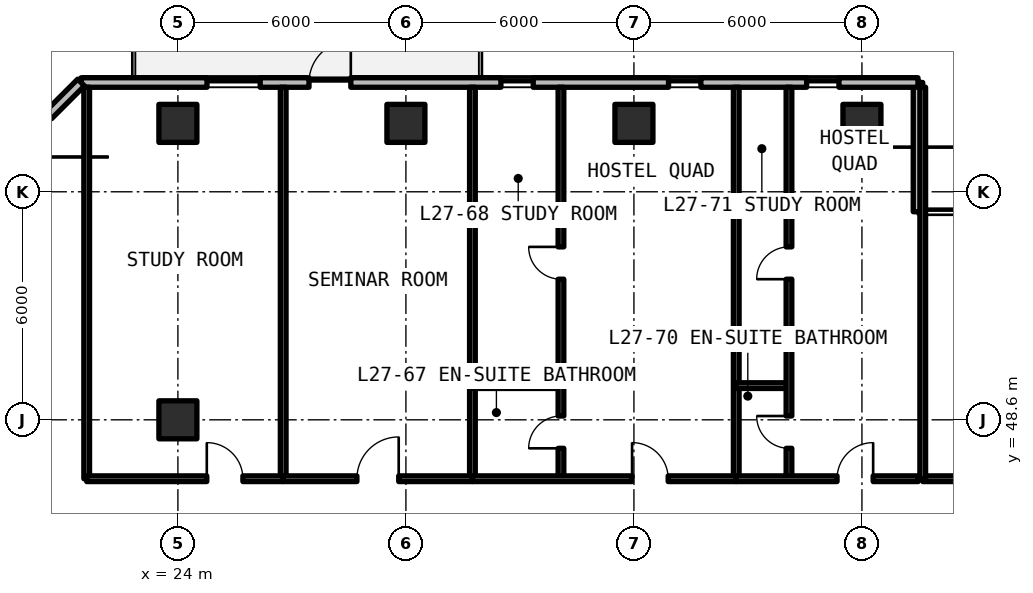
"""IFC4 building model, lengths in metres.
Left out: names, types, materials, properties, quantities, classifications, styles, units other than length and angle.
Written with IfcOpenShell. Run it as: python <this file> out.ifc"""

import sys

from ifc_helpers import new_model, si_unit, direction, frame, frame_2d, origin, origin_2d, place, context, subcontext, project, spatial, rectangle, extrude, element, fill, save


model = new_model("IFC4")
c1 = context("Model", 3, precision=1e-05, world=origin(), true_north=direction((0.0, 1.0)))
c2 = subcontext(c1, "Body", "Model", "MODEL_VIEW")
j1 = project(units=[si_unit("LENGTHUNIT", "METRE"), si_unit("PLANEANGLEUNIT", "RADIAN")], contexts=[c1])
p1 = place(None, origin())
s1 = spatial("IfcSite", under=j1, at=p1, CompositionType="ELEMENT")
p2 = place(p1, origin())
s2 = spatial("IfcBuilding", under=s1, at=p2, CompositionType="ELEMENT")
p3 = place(p2, frame((0.0, 0.0, 98.67)))
s3 = spatial("IfcBuildingStorey", under=s2, at=p3, CompositionType="ELEMENT", Elevation=98.67)
for number, where, z_axis, x_axis in (
    (1, (24.0, 48.6, 0.0), (0.0, 0.0, 1.0), (1.0, 0.0, 0.0)),
    (2, (24.0, 56.4, 0.0), (0.0, 0.0, 1.0), (1.0, 0.0, 0.0)),
    (3, (30.0, 56.4, 0.0), (0.0, 0.0, 1.0), (1.0, 0.0, 0.0)),
    (4, (36.0, 56.4, 0.0), (0.0, 0.0, 1.0), (1.0, 0.0, 0.0)),
    (5, (42.0, 56.4, 0.0), (0.0, 0.0, 1.0), (1.0, 0.0, 0.0)),
):
    element("IfcColumn", number, at=place(p3, frame(where, z_axis=z_axis, x_axis=x_axis)), inside=s3, PredefinedType="COLUMN", context=c2, shape_type="SweptSolid", body=[
        extrude(rectangle(XDim=1.0, YDim=1.0, at=origin_2d()), origin(), (0.0, 0.0, 1.0), 3.3),
    ])
p4 = place(p3, frame((43.475, 54.075, 0.0), z_axis=(0.0, 0.0, 1.0), x_axis=(0.0, 1.0, 0.0)))
e6 = element("IfcWall", 6, at=p4, inside=s3, PredefinedType="SOLIDWALL", context=c2, shape_type="SweptSolid", body=[
    extrude(rectangle(XDim=3.4, YDim=0.25, at=frame_2d((1.7, 0.0))), origin(), (0.0, 0.0, 1.0), 3.08),
])
p5 = place(p3, frame((43.475, 57.475, 0.0), z_axis=(0.0, 0.0, 1.0), x_axis=(-1.0, 0.0, 0.0)))
e7 = element("IfcWall", 7, at=p5, inside=s3, PredefinedType="SOLIDWALL", context=c2, shape_type="SweptSolid", body=[
    extrude(rectangle(XDim=22.023, YDim=0.25, at=frame_2d((11.012, 0.0))), origin(), (0.0, 0.0, 1.0), 3.08),
])
p6 = place(p5, frame((14.925, 0.0, 0.0)))
e8 = element("IfcOpeningElement", 8, at=p6, cuts=e7, PredefinedType="OPENING", context=c2, shape_type="SweptSolid", body=[
    extrude(rectangle(XDim=1.1, YDim=2.15, at=frame_2d((0.55, 1.075))), frame((0.0, 0.135, 0.0), z_axis=(0.0, -1.0, 0.0), x_axis=(1.0, 0.0, 0.0)), (0.0, 0.0, 1.0), 0.27),
])
p7 = place(p5, frame((17.31, 0.0, 0.78)))
e9 = element("IfcOpeningElement", 9, at=p7, cuts=e7, PredefinedType="OPENING", context=c2, shape_type="SweptSolid", body=[
    extrude(rectangle(XDim=1.4, YDim=1.65, at=frame_2d((0.7, 0.825))), frame((0.0, 0.135, 0.0), z_axis=(0.0, -1.0, 0.0), x_axis=(1.0, 0.0, 0.0)), (0.0, 0.0, 1.0), 0.27),
])
p8 = place(p5, frame((10.125, 0.0, 0.78)))
e10 = element("IfcOpeningElement", 10, at=p8, cuts=e7, PredefinedType="OPENING", context=c2, shape_type="SweptSolid", body=[
    extrude(rectangle(XDim=0.85, YDim=1.65, at=frame_2d((0.425, 0.825))), frame((0.0, 0.135, 0.0), z_axis=(0.0, -1.0, 0.0), x_axis=(1.0, 0.0, 0.0)), (0.0, 0.0, 1.0), 0.27),
])
p9 = place(p5, frame((5.714, 0.0, 0.78)))
e11 = element("IfcOpeningElement", 11, at=p9, cuts=e7, PredefinedType="OPENING", context=c2, shape_type="SweptSolid", body=[
    extrude(rectangle(XDim=0.85, YDim=1.65, at=frame_2d((0.425, 0.825))), frame((0.0, 0.135, 0.0), z_axis=(0.0, -1.0, 0.0), x_axis=(1.0, 0.0, 0.0)), (0.0, 0.0, 1.0), 0.27),
])
p10 = place(p5, frame((2.08, 0.0, 0.78)))
e12 = element("IfcOpeningElement", 12, at=p10, cuts=e7, PredefinedType="OPENING", context=c2, shape_type="SweptSolid", body=[
    extrude(rectangle(XDim=0.85, YDim=1.65, at=frame_2d((0.425, 0.825))), frame((0.0, 0.135, 0.0), z_axis=(0.0, -1.0, 0.0), x_axis=(1.0, 0.0, 0.0)), (0.0, 0.0, 1.0), 0.27),
])
p11 = place(p3, frame((21.452, 57.475, 0.0), z_axis=(0.0, 0.0, 1.0), x_axis=(-0.707106781187, -0.707106781187, 0.0)))
e13 = element("IfcWall", 13, at=p11, inside=s3, PredefinedType="SOLIDWALL", context=c2, shape_type="SweptSolid", body=[
    extrude(rectangle(XDim=5.836, YDim=0.25, at=frame_2d((2.918, 0.0))), origin(), (0.0, 0.0, 1.0), 3.08),
])
p12 = place(p11, frame((1.218, 0.0, 0.78)))
e14 = element("IfcOpeningElement", 14, at=p12, cuts=e13, PredefinedType="OPENING", context=c2, shape_type="SweptSolid", body=[
    extrude(rectangle(XDim=3.4, YDim=1.66, at=frame_2d((1.7, 0.83))), frame((0.0, 0.135, 0.0), z_axis=(0.0, -1.0, 0.0), x_axis=(1.0, 0.0, 0.0)), (0.0, 0.0, 1.0), 0.27),
])
p13 = place(p3, frame((43.6, 47.05, 0.0), z_axis=(0.0, 0.0, 1.0), x_axis=(1.0, 0.0, 0.0)))
e15 = element("IfcWall", 15, at=p13, inside=s3, PredefinedType="SOLIDWALL", context=c2, shape_type="SweptSolid", body=[
    extrude(rectangle(XDim=8.4, YDim=0.15, at=frame_2d((4.2, 0.0))), origin(), (0.0, 0.0, 1.0), 2.35),
])
p14 = place(p13, frame((3.65, 0.0, 0.0)))
e16 = element("IfcOpeningElement", 16, at=p14, cuts=e15, PredefinedType="OPENING", context=c2, shape_type="SweptSolid", body=[
    extrude(rectangle(XDim=1.1, YDim=2.15, at=frame_2d((0.55, 1.075))), frame((0.0, 0.085, 0.0), z_axis=(0.0, -1.0, 0.0), x_axis=(1.0, 0.0, 0.0)), (0.0, 0.0, 1.0), 0.17),
])
for number, where, z_axis, x_axis in (
    (17, (43.6, 47.05, 0.0), (0.0, 0.0, 1.0), (0.0, 1.0, 0.0)),
    (18, (21.6, 47.05, 0.0), (0.0, 0.0, 1.0), (0.0, 1.0, 0.0)),
    (19, (26.771, 47.05, 0.0), (0.0, 0.0, 1.0), (0.0, 1.0, 0.0)),
):
    element("IfcWall", number, at=place(p3, frame(where, z_axis=z_axis, x_axis=x_axis)), inside=s3, PredefinedType="SOLIDWALL", context=c2, shape_type="SweptSolid", body=[
        extrude(rectangle(XDim=10.3, YDim=0.15, at=frame_2d((5.15, 0.0))), origin(), (0.0, 0.0, 1.0), 2.35),
    ])
p15 = place(p3, frame((21.6, 47.05, 0.0), z_axis=(0.0, 0.0, 1.0), x_axis=(1.0, 0.0, 0.0)))
e20 = element("IfcWall", 20, at=p15, inside=s3, PredefinedType="SOLIDWALL", context=c2, shape_type="SweptSolid", body=[
    extrude(rectangle(XDim=5.171, YDim=0.15, at=frame_2d((2.585, 0.0))), origin(), (0.0, 0.0, 1.0), 2.35),
])
p16 = place(p15, frame((3.16, 0.0, 0.0)))
e21 = element("IfcOpeningElement", 21, at=p16, cuts=e20, PredefinedType="OPENING", context=c2, shape_type="SweptSolid", body=[
    extrude(rectangle(XDim=0.95, YDim=2.15, at=frame_2d((0.475, 1.075))), frame((0.0, 0.085, 0.0), z_axis=(0.0, -1.0, 0.0), x_axis=(1.0, 0.0, 0.0)), (0.0, 0.0, 1.0), 0.17),
])
p17 = place(p3, frame((31.75, 47.05, 0.0), z_axis=(0.0, 0.0, 1.0), x_axis=(0.0, 1.0, 0.0)))
e22 = element("IfcWall", 22, at=p17, inside=s3, PredefinedType="SOLIDWALL", context=c2, shape_type="SweptSolid", body=[
    extrude(rectangle(XDim=10.3, YDim=0.15, at=frame_2d((5.15, 0.0))), origin(), (0.0, 0.0, 1.0), 2.35),
])
p18 = place(p3, frame((26.771, 47.05, 0.0), z_axis=(0.0, 0.0, 1.0), x_axis=(1.0, 0.0, 0.0)))
e23 = element("IfcWall", 23, at=p18, inside=s3, PredefinedType="SOLIDWALL", context=c2, shape_type="SweptSolid", body=[
    extrude(rectangle(XDim=4.979, YDim=0.15, at=frame_2d((2.49, 0.0))), origin(), (0.0, 0.0, 1.0), 2.35),
])
p19 = place(p18, frame((1.94, 0.0, 0.0)))
e24 = element("IfcOpeningElement", 24, at=p19, cuts=e23, PredefinedType="OPENING", context=c2, shape_type="SweptSolid", body=[
    extrude(rectangle(XDim=1.1, YDim=2.15, at=frame_2d((0.55, 1.075))), frame((0.0, 0.085, 0.0), z_axis=(0.0, -1.0, 0.0), x_axis=(1.0, 0.0, 0.0)), (0.0, 0.0, 1.0), 0.17),
])
p20 = place(p3, frame((38.692, 47.05, 0.0), z_axis=(0.0, 0.0, 1.0), x_axis=(0.0, 1.0, 0.0)))
e25 = element("IfcWall", 25, at=p20, inside=s3, PredefinedType="SOLIDWALL", context=c2, shape_type="SweptSolid", body=[
    extrude(rectangle(XDim=10.3, YDim=0.15, at=frame_2d((5.15, 0.0))), origin(), (0.0, 0.0, 1.0), 2.35),
])
p21 = place(p3, frame((31.75, 49.5, 0.0), z_axis=(0.0, 0.0, 1.0), x_axis=(1.0, 0.0, 0.0)))
e26 = element("IfcWall", 26, at=p21, inside=s3, PredefinedType="PARTITIONING", context=c2, shape_type="SweptSolid", body=[
    extrude(rectangle(XDim=2.33, YDim=0.15, at=frame_2d((1.165, 0.0))), origin(), (0.0, 0.0, 1.0), 2.35),
])
p22 = place(p3, frame((34.08, 47.05, 0.0), z_axis=(0.0, 0.0, 1.0), x_axis=(0.0, 1.0, 0.0)))
e27 = element("IfcWall", 27, at=p22, inside=s3, PredefinedType="PARTITIONING", context=c2, shape_type="SweptSolid", body=[
    extrude(rectangle(XDim=10.3, YDim=0.15, at=frame_2d((5.15, 0.0))), origin(), (0.0, 0.0, 1.0), 2.35),
])
p23 = place(p22, frame((0.8, 0.0, 0.0)))
e28 = element("IfcOpeningElement", 28, at=p23, cuts=e27, PredefinedType="OPENING", context=c2, shape_type="SweptSolid", body=[
    extrude(rectangle(XDim=0.85, YDim=2.1, at=frame_2d((0.425, 1.05))), frame((0.0, 0.085, 0.0), z_axis=(0.0, -1.0, 0.0), x_axis=(1.0, 0.0, 0.0)), (0.0, 0.0, 1.0), 0.17),
])
p24 = place(p22, frame((5.25, 0.0, 0.0)))
e29 = element("IfcOpeningElement", 29, at=p24, cuts=e27, PredefinedType="OPENING", context=c2, shape_type="SweptSolid", body=[
    extrude(rectangle(XDim=0.85, YDim=2.1, at=frame_2d((0.425, 1.05))), frame((0.0, 0.085, 0.0), z_axis=(0.0, -1.0, 0.0), x_axis=(1.0, 0.0, 0.0)), (0.0, 0.0, 1.0), 0.17),
])
p25 = place(p3, frame((31.75, 47.05, 0.0), z_axis=(0.0, 0.0, 1.0), x_axis=(1.0, 0.0, 0.0)))
e30 = element("IfcWall", 30, at=p25, inside=s3, PredefinedType="SOLIDWALL", context=c2, shape_type="SweptSolid", body=[
    extrude(rectangle(XDim=6.942, YDim=0.15, at=frame_2d((3.471, 0.0))), origin(), (0.0, 0.0, 1.0), 2.35),
])
p26 = place(p25, frame((4.201, 0.0, 0.0)))
e31 = element("IfcOpeningElement", 31, at=p26, cuts=e30, PredefinedType="OPENING", context=c2, shape_type="SweptSolid", body=[
    extrude(rectangle(XDim=0.95, YDim=2.15, at=frame_2d((0.475, 1.075))), frame((0.0, 0.085, 0.0), z_axis=(0.0, -1.0, 0.0), x_axis=(1.0, 0.0, 0.0)), (0.0, 0.0, 1.0), 0.17),
])
p27 = place(p3, frame((38.692, 49.5, 0.0), z_axis=(0.0, 0.0, 1.0), x_axis=(1.0, 0.0, 0.0)))
e32 = element("IfcWall", 32, at=p27, inside=s3, PredefinedType="PARTITIONING", context=c2, shape_type="SweptSolid", body=[
    extrude(rectangle(XDim=1.388, YDim=0.15, at=frame_2d((0.694, 0.0))), origin(), (0.0, 0.0, 1.0), 2.35),
])
p28 = place(p3, frame((40.08, 47.05, 0.0), z_axis=(0.0, 0.0, 1.0), x_axis=(0.0, 1.0, 0.0)))
e33 = element("IfcWall", 33, at=p28, inside=s3, PredefinedType="PARTITIONING", context=c2, shape_type="SweptSolid", body=[
    extrude(rectangle(XDim=10.3, YDim=0.15, at=frame_2d((5.15, 0.0))), origin(), (0.0, 0.0, 1.0), 2.35),
])
p29 = place(p28, frame((0.8, 0.0, 0.0)))
e34 = element("IfcOpeningElement", 34, at=p29, cuts=e33, PredefinedType="OPENING", context=c2, shape_type="SweptSolid", body=[
    extrude(rectangle(XDim=0.85, YDim=2.1, at=frame_2d((0.425, 1.05))), frame((0.0, 0.085, 0.0), z_axis=(0.0, -1.0, 0.0), x_axis=(1.0, 0.0, 0.0)), (0.0, 0.0, 1.0), 0.17),
])
p30 = place(p28, frame((5.25, 0.0, 0.0)))
e35 = element("IfcOpeningElement", 35, at=p30, cuts=e33, PredefinedType="OPENING", context=c2, shape_type="SweptSolid", body=[
    extrude(rectangle(XDim=0.85, YDim=2.1, at=frame_2d((0.425, 1.05))), frame((0.0, 0.085, 0.0), z_axis=(0.0, -1.0, 0.0), x_axis=(1.0, 0.0, 0.0)), (0.0, 0.0, 1.0), 0.17),
])
p31 = place(p3, frame((38.692, 47.05, 0.0), z_axis=(0.0, 0.0, 1.0), x_axis=(1.0, 0.0, 0.0)))
e36 = element("IfcWall", 36, at=p31, inside=s3, PredefinedType="SOLIDWALL", context=c2, shape_type="SweptSolid", body=[
    extrude(rectangle(XDim=4.788, YDim=0.15, at=frame_2d((2.394, 0.0))), origin(), (0.0, 0.0, 1.0), 2.35),
])
p32 = place(p31, frame((2.653, 0.0, 0.0)))
e37 = element("IfcOpeningElement", 37, at=p32, cuts=e36, PredefinedType="OPENING", context=c2, shape_type="SweptSolid", body=[
    extrude(rectangle(XDim=0.95, YDim=2.15, at=frame_2d((0.475, 1.075))), frame((0.0, 0.085, 0.0), z_axis=(0.0, -1.0, 0.0), x_axis=(1.0, 0.0, 0.0)), (0.0, 0.0, 1.0), 0.17),
])
p33 = place(p6, frame((1.1, 0.0, 0.0), z_axis=(0.0, 0.0, 1.0), x_axis=(-1.0, 0.0, 0.0)))
e38 = element("IfcDoor", 38, at=p33, inside=s3, OperationType="SINGLE_SWING_LEFT", PredefinedType="DOOR", context=c2, shape_type="SweptSolid", body=[
    extrude(rectangle(XDim=1.1, YDim=2.15, at=frame_2d((0.55, 1.075))), frame((0.0, 0.025, 0.0), z_axis=(0.0, -1.0, 0.0), x_axis=(1.0, 0.0, 0.0)), (0.0, 0.0, 1.0), 0.05),
])
fill(e8, e38)
p34 = place(p7, origin())
e39 = element("IfcWindow", 39, at=p34, inside=s3, PartitioningType="SINGLE_PANEL", PredefinedType="WINDOW", context=c2, shape_type="SweptSolid", body=[
    extrude(rectangle(XDim=1.4, YDim=1.65, at=frame_2d((0.7, 0.825))), frame((0.0, 0.03, 0.0), z_axis=(0.0, -1.0, 0.0), x_axis=(1.0, 0.0, 0.0)), (0.0, 0.0, 1.0), 0.06),
])
fill(e9, e39)
p35 = place(p8, origin())
e40 = element("IfcWindow", 40, at=p35, inside=s3, PartitioningType="SINGLE_PANEL", PredefinedType="WINDOW", context=c2, shape_type="SweptSolid", body=[
    extrude(rectangle(XDim=0.85, YDim=1.65, at=frame_2d((0.425, 0.825))), frame((0.0, 0.03, 0.0), z_axis=(0.0, -1.0, 0.0), x_axis=(1.0, 0.0, 0.0)), (0.0, 0.0, 1.0), 0.06),
])
fill(e10, e40)
p36 = place(p9, origin())
e41 = element("IfcWindow", 41, at=p36, inside=s3, PartitioningType="SINGLE_PANEL", PredefinedType="WINDOW", context=c2, shape_type="SweptSolid", body=[
    extrude(rectangle(XDim=0.85, YDim=1.65, at=frame_2d((0.425, 0.825))), frame((0.0, 0.03, 0.0), z_axis=(0.0, -1.0, 0.0), x_axis=(1.0, 0.0, 0.0)), (0.0, 0.0, 1.0), 0.06),
])
fill(e11, e41)
p37 = place(p10, origin())
e42 = element("IfcWindow", 42, at=p37, inside=s3, PartitioningType="SINGLE_PANEL", PredefinedType="WINDOW", context=c2, shape_type="SweptSolid", body=[
    extrude(rectangle(XDim=0.85, YDim=1.65, at=frame_2d((0.425, 0.825))), frame((0.0, 0.03, 0.0), z_axis=(0.0, -1.0, 0.0), x_axis=(1.0, 0.0, 0.0)), (0.0, 0.0, 1.0), 0.06),
])
fill(e12, e42)
p38 = place(p16, origin())
e43 = element("IfcDoor", 43, at=p38, inside=s3, OperationType="SINGLE_SWING_LEFT", PredefinedType="DOOR", context=c2, shape_type="SweptSolid", body=[
    extrude(rectangle(XDim=0.95, YDim=2.15, at=frame_2d((0.475, 1.075))), frame((0.0, 0.025, 0.0), z_axis=(0.0, -1.0, 0.0), x_axis=(1.0, 0.0, 0.0)), (0.0, 0.0, 1.0), 0.05),
])
fill(e21, e43)
p39 = place(p19, origin())
e44 = element("IfcDoor", 44, at=p39, inside=s3, OperationType="SINGLE_SWING_RIGHT", PredefinedType="DOOR", context=c2, shape_type="SweptSolid", body=[
    extrude(rectangle(XDim=1.1, YDim=2.15, at=frame_2d((0.55, 1.075))), frame((0.0, 0.025, 0.0), z_axis=(0.0, -1.0, 0.0), x_axis=(1.0, 0.0, 0.0)), (0.0, 0.0, 1.0), 0.05),
])
fill(e24, e44)
p40 = place(p23, origin())
e45 = element("IfcDoor", 45, at=p40, inside=s3, OperationType="SINGLE_SWING_LEFT", PredefinedType="DOOR", context=c2, shape_type="SweptSolid", body=[
    extrude(rectangle(XDim=0.85, YDim=2.1, at=frame_2d((0.425, 1.05))), frame((0.0, 0.025, 0.0), z_axis=(0.0, -1.0, 0.0), x_axis=(1.0, 0.0, 0.0)), (0.0, 0.0, 1.0), 0.05),
])
fill(e28, e45)
p41 = place(p24, origin())
e46 = element("IfcDoor", 46, at=p41, inside=s3, OperationType="SINGLE_SWING_RIGHT", PredefinedType="DOOR", context=c2, shape_type="SweptSolid", body=[
    extrude(rectangle(XDim=0.85, YDim=2.1, at=frame_2d((0.425, 1.05))), frame((0.0, 0.025, 0.0), z_axis=(0.0, -1.0, 0.0), x_axis=(1.0, 0.0, 0.0)), (0.0, 0.0, 1.0), 0.05),
])
fill(e29, e46)
p42 = place(p26, origin())
e47 = element("IfcDoor", 47, at=p42, inside=s3, OperationType="SINGLE_SWING_LEFT", PredefinedType="DOOR", context=c2, shape_type="SweptSolid", body=[
    extrude(rectangle(XDim=0.95, YDim=2.15, at=frame_2d((0.475, 1.075))), frame((0.0, 0.025, 0.0), z_axis=(0.0, -1.0, 0.0), x_axis=(1.0, 0.0, 0.0)), (0.0, 0.0, 1.0), 0.05),
])
fill(e31, e47)
p43 = place(p29, origin())
e48 = element("IfcDoor", 48, at=p43, inside=s3, OperationType="SINGLE_SWING_RIGHT", PredefinedType="DOOR", context=c2, shape_type="SweptSolid", body=[
    extrude(rectangle(XDim=0.85, YDim=2.1, at=frame_2d((0.425, 1.05))), frame((0.0, 0.025, 0.0), z_axis=(0.0, -1.0, 0.0), x_axis=(1.0, 0.0, 0.0)), (0.0, 0.0, 1.0), 0.05),
])
fill(e34, e48)
p44 = place(p30, origin())
e49 = element("IfcDoor", 49, at=p44, inside=s3, OperationType="SINGLE_SWING_LEFT", PredefinedType="DOOR", context=c2, shape_type="SweptSolid", body=[
    extrude(rectangle(XDim=0.85, YDim=2.1, at=frame_2d((0.425, 1.05))), frame((0.0, 0.025, 0.0), z_axis=(0.0, -1.0, 0.0), x_axis=(1.0, 0.0, 0.0)), (0.0, 0.0, 1.0), 0.05),
])
fill(e35, e49)
p45 = place(p32, origin())
e50 = element("IfcDoor", 50, at=p45, inside=s3, OperationType="SINGLE_SWING_RIGHT", PredefinedType="DOOR", context=c2, shape_type="SweptSolid", body=[
    extrude(rectangle(XDim=0.95, YDim=2.15, at=frame_2d((0.475, 1.075))), frame((0.0, 0.025, 0.0), z_axis=(0.0, -1.0, 0.0), x_axis=(1.0, 0.0, 0.0)), (0.0, 0.0, 1.0), 0.05),
])
fill(e37, e50)
save(model, sys.argv[1])
